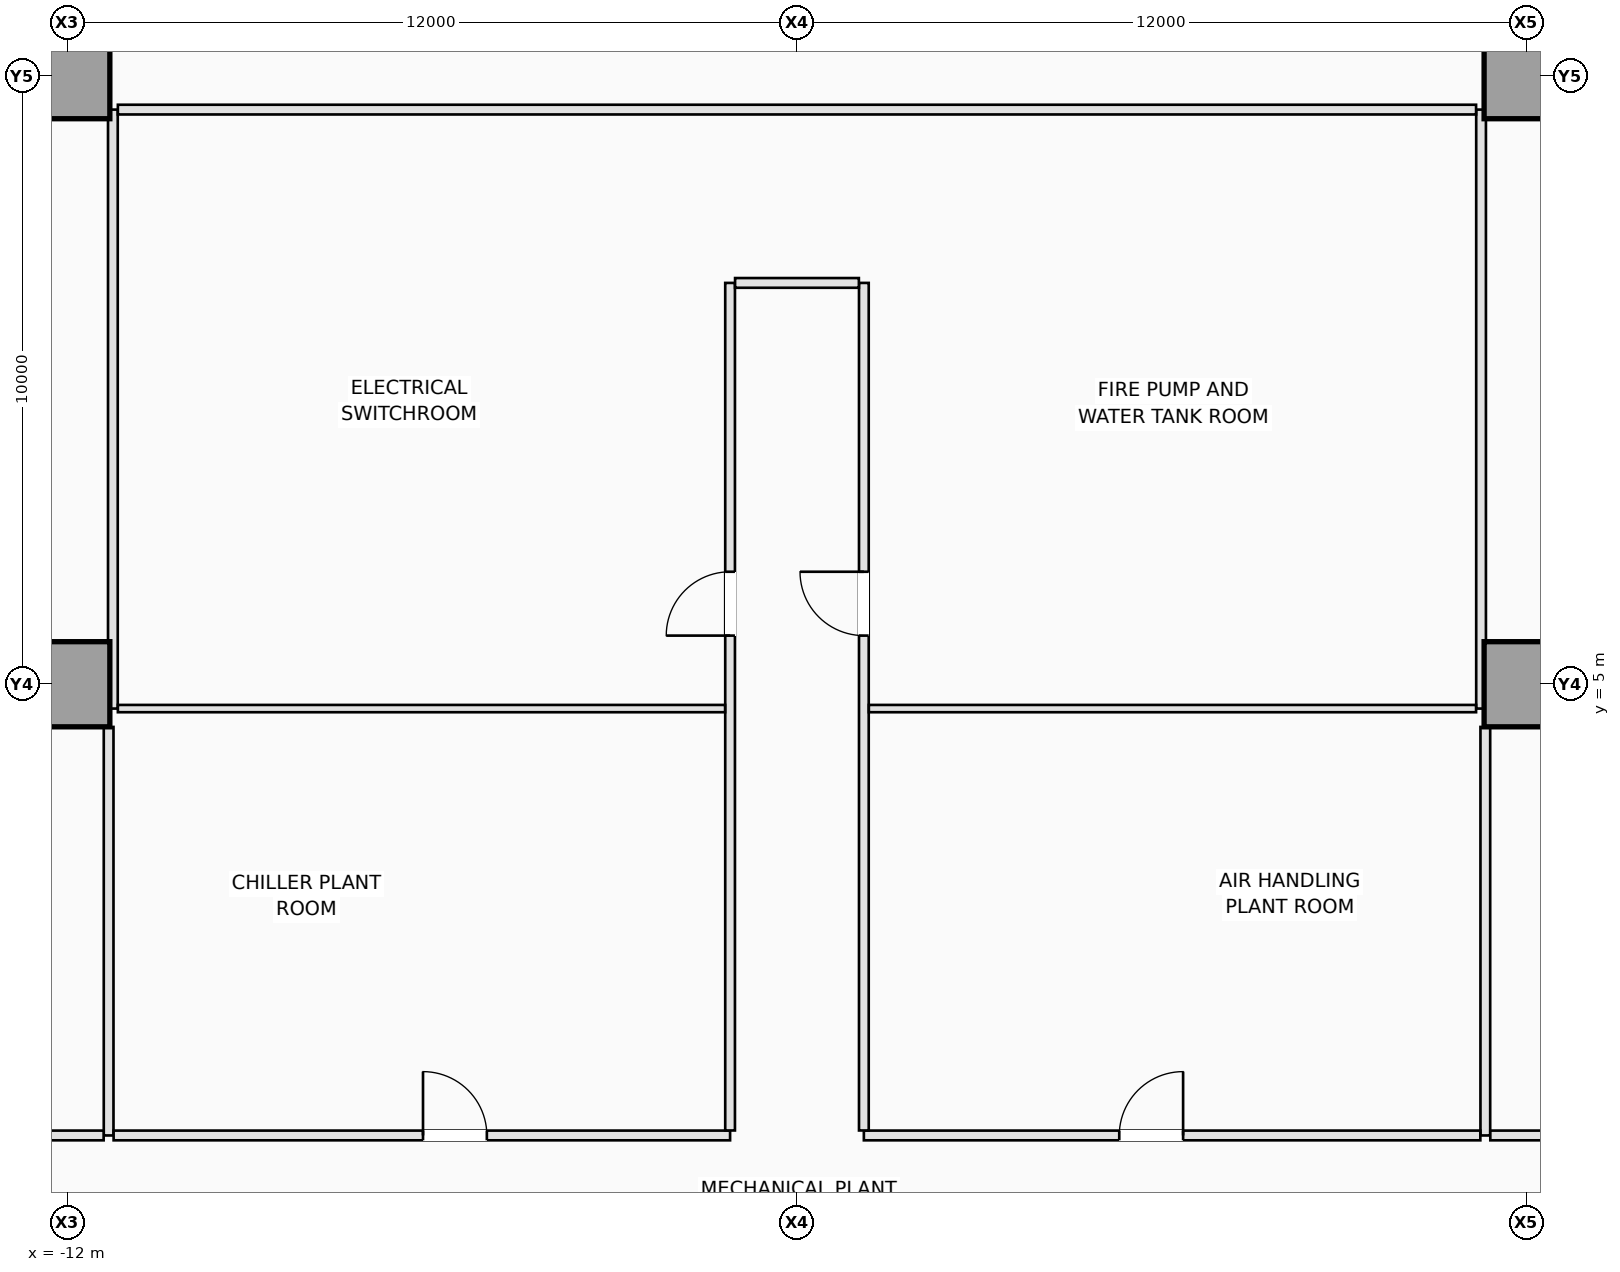
"""IFC4 building model, lengths in metres.
Left out: names, types, materials, properties, quantities, classifications, styles, units other than length and angle.
Written with IfcOpenShell. Run it as: python <this file> out.ifc"""

import sys

from ifc_helpers import new_model, si_unit, direction, frame, frame_2d, origin, origin_2d, place, context, subcontext, project, spatial, rectangle, extrude, element, fill, save


model = new_model("IFC4")
c1 = context("Model", 3, precision=1e-05, world=origin(), true_north=direction((0.0, 1.0)))
c2 = subcontext(c1, "Body", "Model", "MODEL_VIEW")
j1 = project(units=[si_unit("LENGTHUNIT", "METRE"), si_unit("PLANEANGLEUNIT", "RADIAN")], contexts=[c1])
p1 = place(None, origin())
s1 = spatial("IfcSite", under=j1, at=p1, CompositionType="ELEMENT")
p2 = place(p1, origin())
s2 = spatial("IfcBuilding", under=s1, at=p2, CompositionType="ELEMENT")
p3 = place(p2, frame((0.0, 0.0, 23.0)))
s3 = spatial("IfcBuildingStorey", under=s2, at=p3, CompositionType="ELEMENT", Elevation=23.0)
for number, where, z_axis, x_axis in (
    (1, (-12.0, 5.0, 0.0), (0.0, 0.0, 1.0), (1.0, 0.0, 0.0)),
    (2, (12.0, 5.0, 0.0), (0.0, 0.0, 1.0), (1.0, 0.0, 0.0)),
    (3, (-12.0, 15.0, 0.0), (0.0, 0.0, 1.0), (1.0, 0.0, 0.0)),
    (4, (12.0, 15.0, 0.0), (0.0, 0.0, 1.0), (1.0, 0.0, 0.0)),
):
    element("IfcColumn", number, at=place(p3, frame(where, z_axis=z_axis, x_axis=x_axis)), inside=s3, PredefinedType="COLUMN", context=c2, shape_type="SweptSolid", body=[
        extrude(rectangle(XDim=1.4, YDim=1.4, at=origin_2d()), origin(), (0.0, 0.0, 1.0), 4.6),
    ])
for number, where, z_axis, x_axis in (
    (5, (-11.32, -2.42, 0.0), (0.0, 0.0, 1.0), (0.0, 1.0, 0.0)),
    (6, (11.32, -2.42, 0.0), (0.0, 0.0, 1.0), (0.0, 1.0, 0.0)),
):
    element("IfcWall", number, at=place(p3, frame(where, z_axis=z_axis, x_axis=x_axis)), inside=s3, PredefinedType="PARTITIONING", context=c2, shape_type="SweptSolid", body=[
        extrude(rectangle(XDim=6.718, YDim=0.16, at=frame_2d((3.359, 0.0))), origin(), (0.0, 0.0, 1.0), 4.35),
    ])
for number, where, z_axis, x_axis in (
    (7, (-11.25, 4.6, 0.0), (0.0, 0.0, 1.0), (0.0, 1.0, 0.0)),
    (8, (11.25, 4.6, 0.0), (0.0, 0.0, 1.0), (0.0, 1.0, 0.0)),
):
    element("IfcWall", number, at=place(p3, frame(where, z_axis=z_axis, x_axis=x_axis)), inside=s3, PredefinedType="PARTITIONING", context=c2, shape_type="SweptSolid", body=[
        extrude(rectangle(XDim=9.85, YDim=0.16, at=frame_2d((4.925, 0.0))), origin(), (0.0, 0.0, 1.0), 4.35),
    ])
p4 = place(p3, frame((-11.168, 14.45, 0.0), z_axis=(0.0, 0.0, 1.0), x_axis=(1.0, 0.0, 0.0)))
e9 = element("IfcWall", 9, at=p4, inside=s3, PredefinedType="PARTITIONING", context=c2, shape_type="SweptSolid", body=[
    extrude(rectangle(XDim=22.336, YDim=0.16, at=frame_2d((11.168, 0.0))), origin(), (0.0, 0.0, 1.0), 4.35),
])
p5 = place(p3, frame((-16.648, -2.42, 0.0), z_axis=(0.0, 0.0, 1.0), x_axis=(1.0, 0.0, 0.0)))
e10 = element("IfcWall", 10, at=p5, inside=s3, PredefinedType="PARTITIONING", context=c2, shape_type="SweptSolid", body=[
    extrude(rectangle(XDim=5.246, YDim=0.16, at=frame_2d((2.623, 0.0))), origin(), (0.0, 0.0, 1.0), 4.35),
])
p6 = place(p5, frame((2.098, 0.0, 0.0)))
e11 = element("IfcOpeningElement", 11, at=p6, cuts=e10, PredefinedType="OPENING", context=c2, shape_type="SweptSolid", body=[
    extrude(rectangle(XDim=1.0, YDim=2.15, at=frame_2d((0.5, 1.075))), frame((0.0, 0.09, 0.0), z_axis=(0.0, -1.0, 0.0), x_axis=(1.0, 0.0, 0.0)), (0.0, 0.0, 1.0), 0.18),
])
p7 = place(p3, frame((-11.238, -2.42, 0.0), z_axis=(0.0, 0.0, 1.0), x_axis=(1.0, 0.0, 0.0)))
e12 = element("IfcWall", 12, at=p7, inside=s3, PredefinedType="PARTITIONING", context=c2, shape_type="SweptSolid", body=[
    extrude(rectangle(XDim=10.138, YDim=0.16, at=frame_2d((5.069, 0.0))), origin(), (0.0, 0.0, 1.0), 4.35),
])
p8 = place(p7, frame((5.088, 0.0, 0.0)))
e13 = element("IfcOpeningElement", 13, at=p8, cuts=e12, PredefinedType="OPENING", context=c2, shape_type="SweptSolid", body=[
    extrude(rectangle(XDim=1.05, YDim=2.12, at=frame_2d((0.525, 1.06))), frame((0.0, 0.09, 0.0), z_axis=(0.0, -1.0, 0.0), x_axis=(1.0, 0.0, 0.0)), (0.0, 0.0, 1.0), 0.18),
])
p9 = place(p3, frame((1.1, -2.42, 0.0), z_axis=(0.0, 0.0, 1.0), x_axis=(1.0, 0.0, 0.0)))
e14 = element("IfcWall", 14, at=p9, inside=s3, PredefinedType="PARTITIONING", context=c2, shape_type="SweptSolid", body=[
    extrude(rectangle(XDim=10.138, YDim=0.16, at=frame_2d((5.069, 0.0))), origin(), (0.0, 0.0, 1.0), 4.35),
])
p10 = place(p9, frame((4.2, 0.0, 0.0)))
e15 = element("IfcOpeningElement", 15, at=p10, cuts=e14, PredefinedType="OPENING", context=c2, shape_type="SweptSolid", body=[
    extrude(rectangle(XDim=1.05, YDim=2.12, at=frame_2d((0.525, 1.06))), frame((0.0, 0.09, 0.0), z_axis=(0.0, -1.0, 0.0), x_axis=(1.0, 0.0, 0.0)), (0.0, 0.0, 1.0), 0.18),
])
p11 = place(p3, frame((11.402, -2.42, 0.0), z_axis=(0.0, 0.0, 1.0), x_axis=(1.0, 0.0, 0.0)))
e16 = element("IfcWall", 16, at=p11, inside=s3, PredefinedType="PARTITIONING", context=c2, shape_type="SweptSolid", body=[
    extrude(rectangle(XDim=5.246, YDim=0.16, at=frame_2d((2.623, 0.0))), origin(), (0.0, 0.0, 1.0), 4.35),
])
p12 = place(p11, frame((1.098, 0.0, 0.0)))
e17 = element("IfcOpeningElement", 17, at=p12, cuts=e16, PredefinedType="OPENING", context=c2, shape_type="SweptSolid", body=[
    extrude(rectangle(XDim=1.0, YDim=2.15, at=frame_2d((0.5, 1.075))), frame((0.0, 0.09, 0.0), z_axis=(0.0, -1.0, 0.0), x_axis=(1.0, 0.0, 0.0)), (0.0, 0.0, 1.0), 0.18),
])
p13 = place(p3, frame((-1.1, -2.338, 0.0), z_axis=(0.0, 0.0, 1.0), x_axis=(0.0, 1.0, 0.0)))
e18 = element("IfcWall", 18, at=p13, inside=s3, PredefinedType="PARTITIONING", context=c2, shape_type="SweptSolid", body=[
    extrude(rectangle(XDim=13.938, YDim=0.16, at=frame_2d((6.969, 0.0))), origin(), (0.0, 0.0, 1.0), 4.35),
])
p14 = place(p13, frame((8.138, 0.0, 0.0)))
e19 = element("IfcOpeningElement", 19, at=p14, cuts=e18, PredefinedType="OPENING", context=c2, shape_type="SweptSolid", body=[
    extrude(rectangle(XDim=1.05, YDim=2.12, at=frame_2d((0.525, 1.06))), frame((0.0, 0.09, 0.0), z_axis=(0.0, -1.0, 0.0), x_axis=(1.0, 0.0, 0.0)), (0.0, 0.0, 1.0), 0.18),
])
p15 = place(p3, frame((1.1, -2.338, 0.0), z_axis=(0.0, 0.0, 1.0), x_axis=(0.0, 1.0, 0.0)))
e20 = element("IfcWall", 20, at=p15, inside=s3, PredefinedType="PARTITIONING", context=c2, shape_type="SweptSolid", body=[
    extrude(rectangle(XDim=13.938, YDim=0.16, at=frame_2d((6.969, 0.0))), origin(), (0.0, 0.0, 1.0), 4.35),
])
p16 = place(p15, frame((8.138, 0.0, 0.0)))
e21 = element("IfcOpeningElement", 21, at=p16, cuts=e20, PredefinedType="OPENING", context=c2, shape_type="SweptSolid", body=[
    extrude(rectangle(XDim=1.05, YDim=2.12, at=frame_2d((0.525, 1.06))), frame((0.0, 0.09, 0.0), z_axis=(0.0, -1.0, 0.0), x_axis=(1.0, 0.0, 0.0)), (0.0, 0.0, 1.0), 0.18),
])
p17 = place(p3, frame((-1.018, 11.6, 0.0), z_axis=(0.0, 0.0, 1.0), x_axis=(1.0, 0.0, 0.0)))
e22 = element("IfcWall", 22, at=p17, inside=s3, PredefinedType="PARTITIONING", context=c2, shape_type="SweptSolid", body=[
    extrude(rectangle(XDim=2.036, YDim=0.16, at=frame_2d((1.018, 0.0))), origin(), (0.0, 0.0, 1.0), 4.35),
])
for number, where, z_axis, x_axis in (
    (23, (-11.168, 4.6, 0.0), (0.0, 0.0, 1.0), (1.0, 0.0, 0.0)),
    (24, (1.182, 4.6, 0.0), (0.0, 0.0, 1.0), (1.0, 0.0, 0.0)),
):
    element("IfcWall", number, at=place(p3, frame(where, z_axis=z_axis, x_axis=x_axis)), inside=s3, PredefinedType="PARTITIONING", context=c2, shape_type="SweptSolid", body=[
        extrude(rectangle(XDim=9.986, YDim=0.12, at=frame_2d((4.993, 0.0))), origin(), (0.0, 0.0, 1.0), 2.55),
    ])
p18 = place(p8, origin())
e25 = element("IfcDoor", 25, at=p18, inside=s3, OperationType="SINGLE_SWING_LEFT", PredefinedType="DOOR", context=c2, shape_type="SweptSolid", body=[
    extrude(rectangle(XDim=1.05, YDim=2.12, at=frame_2d((0.525, 1.06))), frame((0.0, 0.025, 0.0), z_axis=(0.0, -1.0, 0.0), x_axis=(1.0, 0.0, 0.0)), (0.0, 0.0, 1.0), 0.05),
])
fill(e13, e25)
p19 = place(p10, origin())
e26 = element("IfcDoor", 26, at=p19, inside=s3, OperationType="SINGLE_SWING_RIGHT", PredefinedType="DOOR", context=c2, shape_type="SweptSolid", body=[
    extrude(rectangle(XDim=1.05, YDim=2.12, at=frame_2d((0.525, 1.06))), frame((0.0, 0.025, 0.0), z_axis=(0.0, -1.0, 0.0), x_axis=(1.0, 0.0, 0.0)), (0.0, 0.0, 1.0), 0.05),
])
fill(e15, e26)
p20 = place(p14, origin())
e27 = element("IfcDoor", 27, at=p20, inside=s3, OperationType="SINGLE_SWING_LEFT", PredefinedType="DOOR", context=c2, shape_type="SweptSolid", body=[
    extrude(rectangle(XDim=1.05, YDim=2.12, at=frame_2d((0.525, 1.06))), frame((0.0, 0.025, 0.0), z_axis=(0.0, -1.0, 0.0), x_axis=(1.0, 0.0, 0.0)), (0.0, 0.0, 1.0), 0.05),
])
fill(e19, e27)
p21 = place(p16, origin())
e28 = element("IfcDoor", 28, at=p21, inside=s3, OperationType="SINGLE_SWING_RIGHT", PredefinedType="DOOR", context=c2, shape_type="SweptSolid", body=[
    extrude(rectangle(XDim=1.05, YDim=2.12, at=frame_2d((0.525, 1.06))), frame((0.0, 0.025, 0.0), z_axis=(0.0, -1.0, 0.0), x_axis=(1.0, 0.0, 0.0)), (0.0, 0.0, 1.0), 0.05),
])
fill(e21, e28)
save(model, sys.argv[1])
